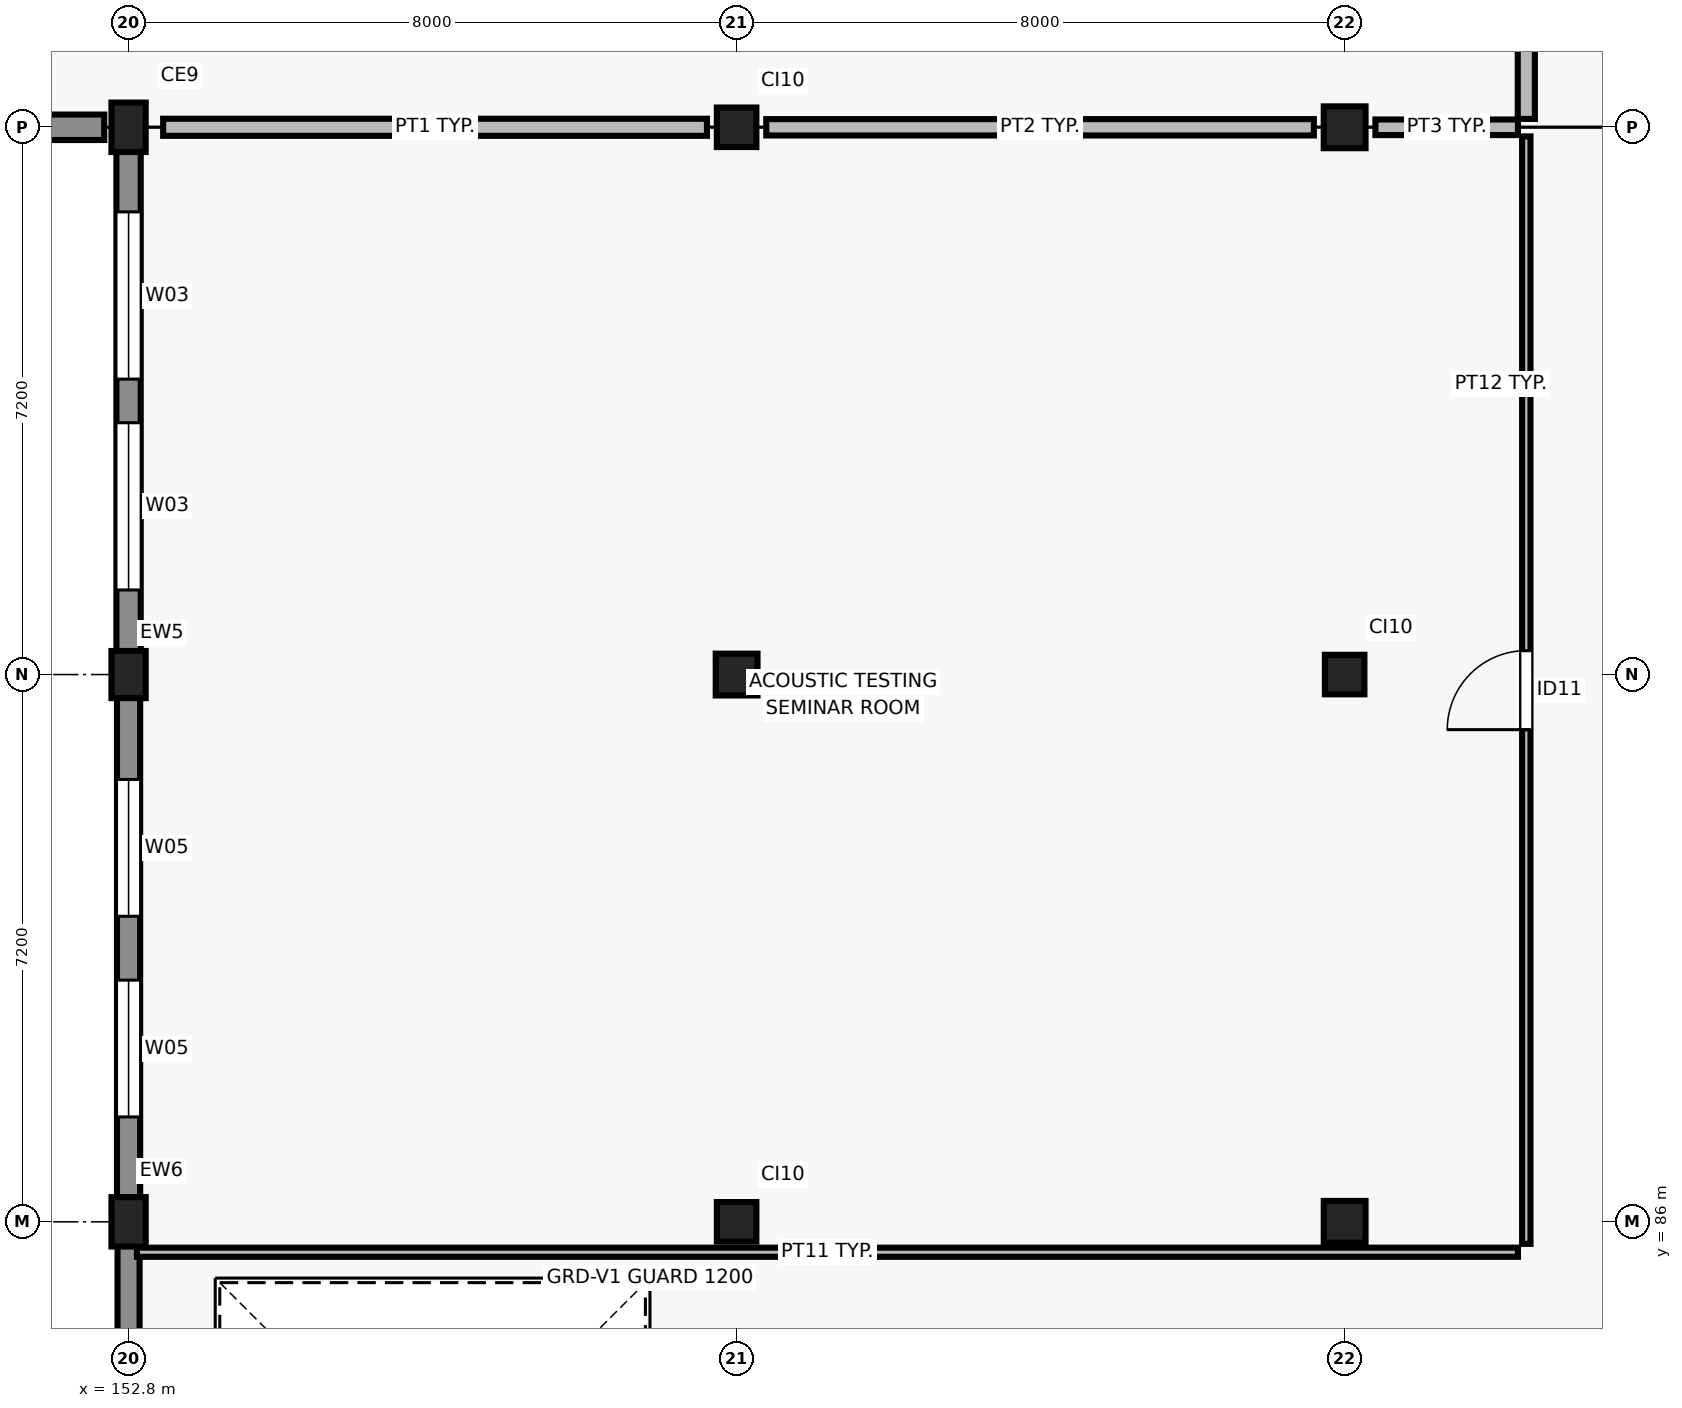
"""IFC4 building model, lengths in metres.
Left out: names, types, materials, properties, quantities, classifications, styles, units other than length and angle.
Written with IfcOpenShell. Run it as: python <this file> out.ifc"""

import sys

from ifc_helpers import new_model, si_unit, direction, frame, frame_2d, origin, origin_2d, place, context, subcontext, project, spatial, rectangle, extrude, element, fill, save


model = new_model("IFC4")
c1 = context("Model", 3, precision=1e-05, world=origin(), true_north=direction((0.0, 1.0)))
c2 = subcontext(c1, "Body", "Model", "MODEL_VIEW")
j1 = project(units=[si_unit("LENGTHUNIT", "METRE"), si_unit("PLANEANGLEUNIT", "RADIAN")], contexts=[c1])
p1 = place(None, origin())
s1 = spatial("IfcSite", under=j1, at=p1, CompositionType="ELEMENT")
p2 = place(p1, origin())
s2 = spatial("IfcBuilding", under=s1, at=p2, CompositionType="ELEMENT")
p3 = place(p2, frame((0.0, 0.0, 21.6)))
s3 = spatial("IfcBuildingStorey", under=s2, at=p3, CompositionType="ELEMENT", Elevation=21.6)
p4 = place(p3, frame((152.8, 86.0, 0.0), z_axis=(0.0, 0.0, 1.0), x_axis=(1.0, 0.0, 0.0)))
e1 = element("IfcColumn", 1, at=p4, inside=s3, PredefinedType="COLUMN", context=c2, shape_type="SweptSolid", body=[
    extrude(rectangle(XDim=0.65, YDim=0.45, at=origin_2d()), origin(), (0.0, 0.0, 1.0), 4.2),
])
p5 = place(p3, frame((152.8, 93.2, 0.0), z_axis=(0.0, 0.0, 1.0), x_axis=(1.0, 0.0, 0.0)))
e2 = element("IfcColumn", 2, at=p5, inside=s3, PredefinedType="COLUMN", context=c2, shape_type="SweptSolid", body=[
    extrude(rectangle(XDim=0.62, YDim=0.45, at=origin_2d()), origin(), (0.0, 0.0, 1.0), 4.2),
])
p6 = place(p3, frame((152.8, 100.4, 0.0), z_axis=(0.0, 0.0, 1.0), x_axis=(1.0, 0.0, 0.0)))
e3 = element("IfcColumn", 3, at=p6, inside=s3, PredefinedType="COLUMN", context=c2, shape_type="SweptSolid", body=[
    extrude(rectangle(XDim=0.65, YDim=0.45, at=origin_2d()), origin(), (0.0, 0.0, 1.0), 4.2),
])
p7 = place(p3, frame((160.8, 86.0, 0.0), z_axis=(0.0, 0.0, 1.0), x_axis=(1.0, 0.0, 0.0)))
e4 = element("IfcColumn", 4, at=p7, inside=s3, PredefinedType="COLUMN", context=c2, shape_type="SweptSolid", body=[
    extrude(rectangle(XDim=0.52, YDim=0.52, at=origin_2d()), origin(), (0.0, 0.0, 1.0), 4.2),
])
p8 = place(p3, frame((160.8, 93.2, 0.0), z_axis=(0.0, 0.0, 1.0), x_axis=(1.0, 0.0, 0.0)))
e5 = element("IfcColumn", 5, at=p8, inside=s3, PredefinedType="COLUMN", context=c2, shape_type="SweptSolid", body=[
    extrude(rectangle(XDim=0.55, YDim=0.55, at=origin_2d()), origin(), (0.0, 0.0, 1.0), 4.2),
])
p9 = place(p3, frame((160.8, 100.4, 0.0), z_axis=(0.0, 0.0, 1.0), x_axis=(1.0, 0.0, 0.0)))
e6 = element("IfcColumn", 6, at=p9, inside=s3, PredefinedType="COLUMN", context=c2, shape_type="SweptSolid", body=[
    extrude(rectangle(XDim=0.52, YDim=0.52, at=origin_2d()), origin(), (0.0, 0.0, 1.0), 4.2),
])
p10 = place(p3, frame((168.8, 86.0, 0.0), z_axis=(0.0, 0.0, 1.0), x_axis=(1.0, 0.0, 0.0)))
e7 = element("IfcColumn", 7, at=p10, inside=s3, PredefinedType="COLUMN", context=c2, shape_type="SweptSolid", body=[
    extrude(rectangle(XDim=0.55, YDim=0.55, at=origin_2d()), origin(), (0.0, 0.0, 1.0), 4.2),
])
p11 = place(p3, frame((168.8, 93.2, 0.0), z_axis=(0.0, 0.0, 1.0), x_axis=(1.0, 0.0, 0.0)))
e8 = element("IfcColumn", 8, at=p11, inside=s3, PredefinedType="COLUMN", context=c2, shape_type="SweptSolid", body=[
    extrude(rectangle(XDim=0.52, YDim=0.52, at=origin_2d()), origin(), (0.0, 0.0, 1.0), 4.2),
])
p12 = place(p3, frame((168.8, 100.4, 0.0), z_axis=(0.0, 0.0, 1.0), x_axis=(1.0, 0.0, 0.0)))
e9 = element("IfcColumn", 9, at=p12, inside=s3, PredefinedType="COLUMN", context=c2, shape_type="SweptSolid", body=[
    extrude(rectangle(XDim=0.55, YDim=0.55, at=origin_2d()), origin(), (0.0, 0.0, 1.0), 4.2),
])
p13 = place(p3, frame((145.105, 100.4, 0.0), z_axis=(0.0, 0.0, 1.0), x_axis=(1.0, 0.0, 0.0)))
e10 = element("IfcWall", 10, at=p13, inside=s3, PredefinedType="SOLIDWALL", context=c2, shape_type="SweptSolid", body=[
    extrude(rectangle(XDim=7.375, YDim=0.335, at=frame_2d((3.688, 0.0))), origin(), (0.0, 0.0, 1.0), 3.43),
])
p14 = place(p13, frame((0.765, 0.0, 0.9)))
e11 = element("IfcOpeningElement", 11, at=p14, cuts=e10, PredefinedType="OPENING", context=c2, shape_type="SweptSolid", body=[
    extrude(rectangle(XDim=2.7, YDim=1.8, at=frame_2d((1.35, 0.9))), frame((0.0, 0.177, 0.0), z_axis=(0.0, -1.0, 0.0), x_axis=(1.0, 0.0, 0.0)), (0.0, 0.0, 1.0), 0.355),
])
p15 = place(p13, frame((3.91, 0.0, 0.9)))
e12 = element("IfcOpeningElement", 12, at=p15, cuts=e10, PredefinedType="OPENING", context=c2, shape_type="SweptSolid", body=[
    extrude(rectangle(XDim=2.7, YDim=1.8, at=frame_2d((1.35, 0.9))), frame((0.0, 0.177, 0.0), z_axis=(0.0, -1.0, 0.0), x_axis=(1.0, 0.0, 0.0)), (0.0, 0.0, 1.0), 0.355),
])
p16 = place(p3, frame((152.8, 100.18, 0.0), z_axis=(0.0, 0.0, 1.0), x_axis=(0.0, -1.0, 0.0)))
e13 = element("IfcWall", 13, at=p16, inside=s3, PredefinedType="SOLIDWALL", context=c2, shape_type="SweptSolid", body=[
    extrude(rectangle(XDim=6.76, YDim=0.32, at=frame_2d((3.38, 0.0))), origin(), (0.0, 0.0, 1.0), 3.4),
])
p17 = place(p16, frame((0.893, 0.0, 0.9)))
e14 = element("IfcOpeningElement", 14, at=p17, cuts=e13, PredefinedType="OPENING", context=c2, shape_type="SweptSolid", body=[
    extrude(rectangle(XDim=2.2, YDim=1.8, at=frame_2d((1.1, 0.9))), frame((0.0, 0.17, 0.0), z_axis=(0.0, -1.0, 0.0), x_axis=(1.0, 0.0, 0.0)), (0.0, 0.0, 1.0), 0.34),
])
p18 = place(p16, frame((3.667, 0.0, 0.9)))
e15 = element("IfcOpeningElement", 15, at=p18, cuts=e13, PredefinedType="OPENING", context=c2, shape_type="SweptSolid", body=[
    extrude(rectangle(XDim=2.2, YDim=1.8, at=frame_2d((1.1, 0.9))), frame((0.0, 0.17, 0.0), z_axis=(0.0, -1.0, 0.0), x_axis=(1.0, 0.0, 0.0)), (0.0, 0.0, 1.0), 0.34),
])
p19 = place(p3, frame((152.8, 92.98, 0.0), z_axis=(0.0, 0.0, 1.0), x_axis=(0.0, -1.0, 0.0)))
e16 = element("IfcWall", 16, at=p19, inside=s3, PredefinedType="SOLIDWALL", context=c2, shape_type="SweptSolid", body=[
    extrude(rectangle(XDim=6.76, YDim=0.305, at=frame_2d((3.38, 0.0))), origin(), (0.0, 0.0, 1.0), 3.36),
])
p20 = place(p19, frame((1.16, 0.0, 0.9)))
e17 = element("IfcOpeningElement", 17, at=p20, cuts=e16, PredefinedType="OPENING", context=c2, shape_type="SweptSolid", body=[
    extrude(rectangle(XDim=1.8, YDim=1.8, at=frame_2d((0.9, 0.9))), frame((0.0, 0.162, 0.0), z_axis=(0.0, -1.0, 0.0), x_axis=(1.0, 0.0, 0.0)), (0.0, 0.0, 1.0), 0.325),
])
p21 = place(p19, frame((3.8, 0.0, 0.9)))
e18 = element("IfcOpeningElement", 18, at=p21, cuts=e16, PredefinedType="OPENING", context=c2, shape_type="SweptSolid", body=[
    extrude(rectangle(XDim=1.8, YDim=1.8, at=frame_2d((0.9, 0.9))), frame((0.0, 0.162, 0.0), z_axis=(0.0, -1.0, 0.0), x_axis=(1.0, 0.0, 0.0)), (0.0, 0.0, 1.0), 0.325),
])
p22 = place(p3, frame((152.8, 85.78, 0.0), z_axis=(0.0, 0.0, 1.0), x_axis=(0.0, -1.0, 0.0)))
e19 = element("IfcWall", 19, at=p22, inside=s3, PredefinedType="SOLIDWALL", context=c2, shape_type="SweptSolid", body=[
    extrude(rectangle(XDim=6.76, YDim=0.29, at=frame_2d((3.38, 0.0))), origin(), (0.0, 0.0, 1.0), 3.54),
])
p23 = place(p22, frame((1.427, 0.0, 0.9)))
e20 = element("IfcOpeningElement", 20, at=p23, cuts=e19, PredefinedType="OPENING", context=c2, shape_type="SweptSolid", body=[
    extrude(rectangle(XDim=1.4, YDim=1.8, at=frame_2d((0.7, 0.9))), frame((0.0, 0.155, 0.0), z_axis=(0.0, -1.0, 0.0), x_axis=(1.0, 0.0, 0.0)), (0.0, 0.0, 1.0), 0.31),
])
p24 = place(p22, frame((3.933, 0.0, 0.9)))
e21 = element("IfcOpeningElement", 21, at=p24, cuts=e19, PredefinedType="OPENING", context=c2, shape_type="SweptSolid", body=[
    extrude(rectangle(XDim=1.4, YDim=1.8, at=frame_2d((0.7, 0.9))), frame((0.0, 0.155, 0.0), z_axis=(0.0, -1.0, 0.0), x_axis=(1.0, 0.0, 0.0)), (0.0, 0.0, 1.0), 0.31),
])
p25 = place(p3, frame((153.255, 100.4, 0.0), z_axis=(0.0, 0.0, 1.0), x_axis=(1.0, 0.0, 0.0)))
e22 = element("IfcWall", 22, at=p25, inside=s3, PredefinedType="PARTITIONING", context=c2, shape_type="SweptSolid", body=[
    extrude(rectangle(XDim=7.155, YDim=0.225, at=frame_2d((3.578, 0.0))), origin(), (0.0, 0.0, 1.0), 3.26),
])
p26 = place(p3, frame((161.19, 100.4, 0.0), z_axis=(0.0, 0.0, 1.0), x_axis=(1.0, 0.0, 0.0)))
e23 = element("IfcWall", 23, at=p26, inside=s3, PredefinedType="PARTITIONING", context=c2, shape_type="SweptSolid", body=[
    extrude(rectangle(XDim=7.205, YDim=0.215, at=frame_2d((3.603, 0.0))), origin(), (0.0, 0.0, 1.0), 3.32),
])
p27 = place(p3, frame((169.205, 100.4, 0.0), z_axis=(0.0, 0.0, 1.0), x_axis=(1.0, 0.0, 0.0)))
e24 = element("IfcWall", 24, at=p27, inside=s3, PredefinedType="PARTITIONING", context=c2, shape_type="SweptSolid", body=[
    extrude(rectangle(XDim=1.875, YDim=0.205, at=frame_2d((0.938, 0.0))), origin(), (0.0, 0.0, 1.0), 3.33),
])
p28 = place(p3, frame((171.19, 100.51, 0.0), z_axis=(0.0, 0.0, 1.0), x_axis=(0.0, 1.0, 0.0)))
e25 = element("IfcWall", 25, at=p28, inside=s3, PredefinedType="PARTITIONING", context=c2, shape_type="SweptSolid", body=[
    extrude(rectangle(XDim=10.67, YDim=0.225, at=frame_2d((5.335, 0.0))), origin(), (0.0, 0.0, 1.0), 3.9),
])
p29 = place(p3, frame((152.91, 85.6, 0.0), z_axis=(0.0, 0.0, 1.0), x_axis=(1.0, 0.0, 0.0)))
e26 = element("IfcWall", 26, at=p29, inside=s3, PredefinedType="PARTITIONING", context=c2, shape_type="SweptSolid", body=[
    extrude(rectangle(XDim=18.17, YDim=0.12, at=frame_2d((9.085, 0.0))), origin(), (0.0, 0.0, 1.0), 3.9),
])
p30 = place(p3, frame((171.19, 85.71, 0.0), z_axis=(0.0, 0.0, 1.0), x_axis=(0.0, 1.0, 0.0)))
e27 = element("IfcWall", 27, at=p30, inside=s3, PredefinedType="PARTITIONING", context=c2, shape_type="SweptSolid", body=[
    extrude(rectangle(XDim=14.57, YDim=0.11, at=frame_2d((7.285, 0.0))), origin(), (0.0, 0.0, 1.0), 3.9),
])
p31 = place(p30, frame((6.765, 0.0, 0.0)))
e28 = element("IfcOpeningElement", 28, at=p31, cuts=e27, PredefinedType="OPENING", context=c2, shape_type="SweptSolid", body=[
    extrude(rectangle(XDim=1.04, YDim=2.15, at=frame_2d((0.52, 1.075))), frame((0.0, 0.065, 0.0), z_axis=(0.0, -1.0, 0.0), x_axis=(1.0, 0.0, 0.0)), (0.0, 0.0, 1.0), 0.13),
])
p32 = place(p17, origin())
e29 = element("IfcWindow", 29, at=p32, inside=s3, PartitioningType="SINGLE_PANEL", PredefinedType="WINDOW", context=c2, shape_type="SweptSolid", body=[
    extrude(rectangle(XDim=2.2, YDim=1.8, at=frame_2d((1.1, 0.9))), frame((0.0, 0.03, 0.0), z_axis=(0.0, -1.0, 0.0), x_axis=(1.0, 0.0, 0.0)), (0.0, 0.0, 1.0), 0.06),
])
fill(e14, e29)
p33 = place(p18, origin())
e30 = element("IfcWindow", 30, at=p33, inside=s3, PartitioningType="SINGLE_PANEL", PredefinedType="WINDOW", context=c2, shape_type="SweptSolid", body=[
    extrude(rectangle(XDim=2.2, YDim=1.8, at=frame_2d((1.1, 0.9))), frame((0.0, 0.03, 0.0), z_axis=(0.0, -1.0, 0.0), x_axis=(1.0, 0.0, 0.0)), (0.0, 0.0, 1.0), 0.06),
])
fill(e15, e30)
p34 = place(p20, origin())
e31 = element("IfcWindow", 31, at=p34, inside=s3, PartitioningType="SINGLE_PANEL", PredefinedType="WINDOW", context=c2, shape_type="SweptSolid", body=[
    extrude(rectangle(XDim=1.8, YDim=1.8, at=frame_2d((0.9, 0.9))), frame((0.0, 0.03, 0.0), z_axis=(0.0, -1.0, 0.0), x_axis=(1.0, 0.0, 0.0)), (0.0, 0.0, 1.0), 0.06),
])
fill(e17, e31)
p35 = place(p21, origin())
e32 = element("IfcWindow", 32, at=p35, inside=s3, PartitioningType="SINGLE_PANEL", PredefinedType="WINDOW", context=c2, shape_type="SweptSolid", body=[
    extrude(rectangle(XDim=1.8, YDim=1.8, at=frame_2d((0.9, 0.9))), frame((0.0, 0.03, 0.0), z_axis=(0.0, -1.0, 0.0), x_axis=(1.0, 0.0, 0.0)), (0.0, 0.0, 1.0), 0.06),
])
fill(e18, e32)
p36 = place(p31, origin())
e33 = element("IfcDoor", 33, at=p36, inside=s3, OperationType="SINGLE_SWING_LEFT", PredefinedType="DOOR", context=c2, shape_type="SweptSolid", body=[
    extrude(rectangle(XDim=1.04, YDim=2.15, at=frame_2d((0.52, 1.075))), frame((0.0, 0.025, 0.0), z_axis=(0.0, -1.0, 0.0), x_axis=(1.0, 0.0, 0.0)), (0.0, 0.0, 1.0), 0.05),
])
fill(e28, e33)
save(model, sys.argv[1])
